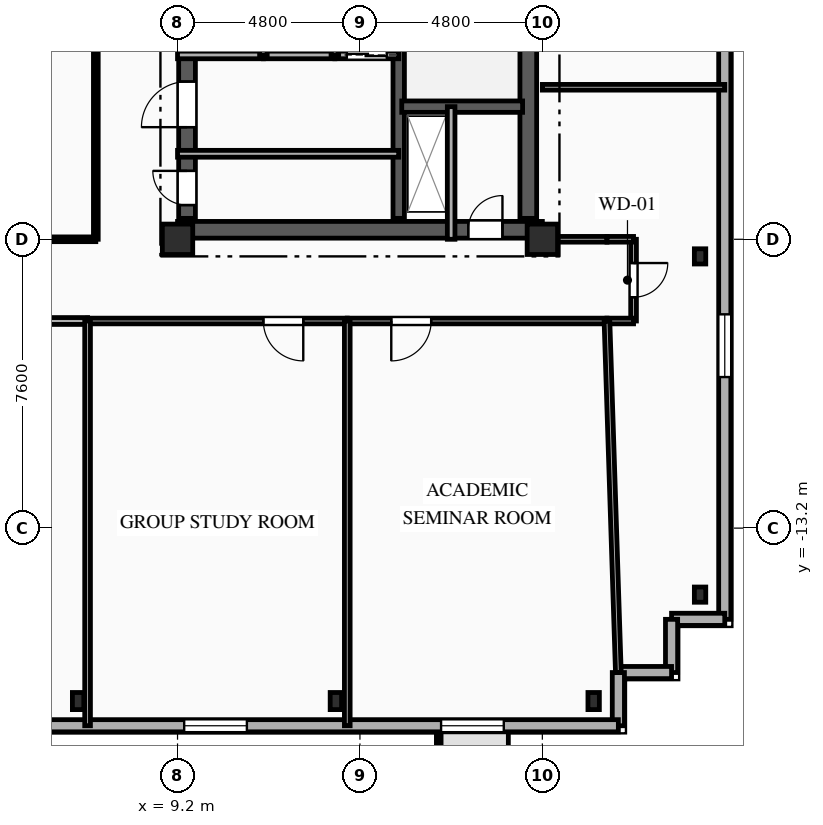
"""IFC4 building model, lengths in metres.
Left out: names, types, materials, properties, quantities, classifications, styles, units other than length and angle.
Written with IfcOpenShell. Run it as: python <this file> out.ifc"""

import sys

from ifc_helpers import new_model, si_unit, direction, frame, frame_2d, origin, origin_2d, place, context, subcontext, project, spatial, rectangle, i_section, extrude, element, fill, save


model = new_model("IFC4")
c1 = context("Model", 3, precision=1e-05, world=origin(), true_north=direction((0.0, 1.0)))
c2 = subcontext(c1, "Body", "Model", "MODEL_VIEW")
j1 = project(units=[si_unit("LENGTHUNIT", "METRE"), si_unit("PLANEANGLEUNIT", "RADIAN")], contexts=[c1])
p1 = place(None, origin())
s1 = spatial("IfcSite", under=j1, at=p1, CompositionType="ELEMENT")
p2 = place(p1, origin())
s2 = spatial("IfcBuilding", under=s1, at=p2, CompositionType="ELEMENT")
p3 = place(p2, frame((0.0, 0.0, 231.65)))
s3 = spatial("IfcBuildingStorey", under=s2, at=p3, CompositionType="ELEMENT", Elevation=231.65)
for number, where, z_axis, x_axis in (
    (1, (9.2, -5.6, 0.0), (0.0, 0.0, 1.0), (1.0, 0.0, 0.0)),
    (2, (18.8, -5.6, 0.0), (0.0, 0.0, 1.0), (1.0, 0.0, 0.0)),
):
    element("IfcColumn", number, at=place(p3, frame(where, z_axis=z_axis, x_axis=x_axis)), inside=s3, PredefinedType="COLUMN", context=c2, shape_type="SweptSolid", body=[
        extrude(rectangle(XDim=0.8, YDim=0.8, at=origin_2d()), origin(), (0.0, 0.0, 1.0), 3.35),
    ])
for number, where, z_axis, x_axis in (
    (3, (6.583, -17.75, 0.0), (0.0, 0.0, 1.0), (1.0, 0.0, 0.0)),
    (4, (13.367, -17.75, 0.0), (0.0, 0.0, 1.0), (1.0, 0.0, 0.0)),
    (5, (20.15, -17.75, 0.0), (0.0, 0.0, 1.0), (1.0, 0.0, 0.0)),
):
    element("IfcColumn", number, at=place(p3, frame(where, z_axis=z_axis, x_axis=x_axis)), inside=s3, PredefinedType="COLUMN", context=c2, shape_type="SweptSolid", body=[
        extrude(i_section(OverallWidth=0.3, OverallDepth=0.45, WebThickness=0.014, FlangeThickness=0.026, FilletRadius=0.027, at=origin_2d()), origin(), (0.0, 0.0, 1.0), 3.35),
    ])
for number, where, z_axis, x_axis in (
    (6, (22.95, -14.95, 0.0), (0.0, 0.0, 1.0), (1.0, 0.0, 0.0)),
    (7, (22.95, -6.05, 0.0), (0.0, 0.0, 1.0), (1.0, 0.0, 0.0)),
):
    element("IfcColumn", number, at=place(p3, frame(where, z_axis=z_axis, x_axis=x_axis)), inside=s3, PredefinedType="COLUMN", context=c2, shape_type="SweptSolid", body=[
        extrude(i_section(OverallWidth=0.3, OverallDepth=0.4, WebThickness=0.013, FlangeThickness=0.024, FilletRadius=0.027, at=origin_2d()), origin(), (0.0, 0.0, 1.0), 3.35),
    ])
p4 = place(p3, frame((23.6, 12.4, 0.0), z_axis=(0.0, 0.0, 1.0), x_axis=(0.0, -1.0, 0.0)))
e8 = element("IfcWall", 8, at=p4, inside=s3, PredefinedType="SOLIDWALL", context=c2, shape_type="SweptSolid", body=[
    extrude(rectangle(XDim=28.0, YDim=0.32, at=frame_2d((14.0, 0.0))), origin(), (0.0, 0.0, 1.0), 3.04),
])
p5 = place(p4, frame((6.415, 0.0, 0.85)))
e9 = element("IfcOpeningElement", 9, at=p5, cuts=e8, PredefinedType="OPENING", context=c2, shape_type="SweptSolid", body=[
    extrude(rectangle(XDim=1.65, YDim=1.85, at=frame_2d((0.825, 0.925))), frame((0.0, 0.17, 0.0), z_axis=(0.0, -1.0, 0.0), x_axis=(1.0, 0.0, 0.0)), (0.0, 0.0, 1.0), 0.34),
])
p6 = place(p4, frame((19.975, 0.0, 0.85)))
e10 = element("IfcOpeningElement", 10, at=p6, cuts=e8, PredefinedType="OPENING", context=c2, shape_type="SweptSolid", body=[
    extrude(rectangle(XDim=1.65, YDim=1.85, at=frame_2d((0.825, 0.925))), frame((0.0, 0.17, 0.0), z_axis=(0.0, -1.0, 0.0), x_axis=(1.0, 0.0, 0.0)), (0.0, 0.0, 1.0), 0.34),
])
p7 = place(p3, frame((23.6, -15.6, 0.0), z_axis=(0.0, 0.0, 1.0), x_axis=(-1.0, 0.0, 0.0)))
e11 = element("IfcWall", 11, at=p7, inside=s3, PredefinedType="SOLIDWALL", context=c2, shape_type="SweptSolid", body=[
    extrude(rectangle(XDim=1.4, YDim=0.32, at=frame_2d((0.7, 0.0))), origin(), (0.0, 0.0, 1.0), 3.04),
])
for number, where, z_axis, x_axis in (
    (12, (22.2, -15.6, 0.0), (0.0, 0.0, 1.0), (0.0, -1.0, 0.0)),
    (13, (22.2, -17.0, 0.0), (0.0, 0.0, 1.0), (-1.0, 0.0, 0.0)),
    (14, (20.8, -17.0, 0.0), (0.0, 0.0, 1.0), (0.0, -1.0, 0.0)),
):
    element("IfcWall", number, at=place(p3, frame(where, z_axis=z_axis, x_axis=x_axis)), inside=s3, PredefinedType="SOLIDWALL", context=c2, shape_type="SweptSolid", body=[
        extrude(rectangle(XDim=1.4, YDim=0.32, at=frame_2d((0.7, 0.0))), origin(), (0.0, 0.0, 1.0), 3.04),
    ])
p8 = place(p3, frame((20.8, -18.4, 0.0), z_axis=(0.0, 0.0, 1.0), x_axis=(-1.0, 0.0, 0.0)))
e15 = element("IfcWall", 15, at=p8, inside=s3, PredefinedType="SOLIDWALL", context=c2, shape_type="SweptSolid", body=[
    extrude(rectangle(XDim=42.0, YDim=0.32, at=frame_2d((21.0, 0.0))), origin(), (0.0, 0.0, 1.0), 3.04),
])
p9 = place(p8, frame((3.015, 0.0, 0.85)))
e16 = element("IfcOpeningElement", 16, at=p9, cuts=e15, PredefinedType="OPENING", context=c2, shape_type="SweptSolid", body=[
    extrude(rectangle(XDim=1.65, YDim=1.85, at=frame_2d((0.825, 0.925))), frame((0.0, 0.17, 0.0), z_axis=(0.0, -1.0, 0.0), x_axis=(1.0, 0.0, 0.0)), (0.0, 0.0, 1.0), 0.34),
])
p10 = place(p8, frame((9.775, 0.0, 0.85)))
e17 = element("IfcOpeningElement", 17, at=p10, cuts=e15, PredefinedType="OPENING", context=c2, shape_type="SweptSolid", body=[
    extrude(rectangle(XDim=1.65, YDim=1.85, at=frame_2d((0.825, 0.925))), frame((0.0, 0.17, 0.0), z_axis=(0.0, -1.0, 0.0), x_axis=(1.0, 0.0, 0.0)), (0.0, 0.0, 1.0), 0.34),
])
p11 = place(p8, frame((19.74, 0.0, 0.85)))
e18 = element("IfcOpeningElement", 18, at=p11, cuts=e15, PredefinedType="OPENING", context=c2, shape_type="SweptSolid", body=[
    extrude(rectangle(XDim=2.2, YDim=1.85, at=frame_2d((1.1, 0.925))), frame((0.0, 0.17, 0.0), z_axis=(0.0, -1.0, 0.0), x_axis=(1.0, 0.0, 0.0)), (0.0, 0.0, 1.0), 0.34),
])
p12 = place(p8, frame((30.255, 0.0, 0.85)))
e19 = element("IfcOpeningElement", 19, at=p12, cuts=e15, PredefinedType="OPENING", context=c2, shape_type="SweptSolid", body=[
    extrude(rectangle(XDim=1.65, YDim=1.85, at=frame_2d((0.825, 0.925))), frame((0.0, 0.17, 0.0), z_axis=(0.0, -1.0, 0.0), x_axis=(1.0, 0.0, 0.0)), (0.0, 0.0, 1.0), 0.34),
])
p13 = place(p8, frame((37.095, 0.0, 0.85)))
e20 = element("IfcOpeningElement", 20, at=p13, cuts=e15, PredefinedType="OPENING", context=c2, shape_type="SweptSolid", body=[
    extrude(rectangle(XDim=1.65, YDim=1.85, at=frame_2d((0.825, 0.925))), frame((0.0, 0.17, 0.0), z_axis=(0.0, -1.0, 0.0), x_axis=(1.0, 0.0, 0.0)), (0.0, 0.0, 1.0), 0.34),
])
p14 = place(p3, frame((9.2, -5.35, 0.0), z_axis=(0.0, 0.0, 1.0), x_axis=(1.0, 0.0, 0.0)))
e21 = element("IfcWall", 21, at=p14, inside=s3, PredefinedType="SHEAR", context=c2, shape_type="SweptSolid", body=[
    extrude(rectangle(XDim=9.6, YDim=0.44, at=frame_2d((4.8, 0.0))), origin(), (0.0, 0.0, 1.0), 3.04),
])
p15 = place(p14, frame((7.65, 0.0, 0.0)))
e22 = element("IfcOpeningElement", 22, at=p15, cuts=e21, PredefinedType="OPENING", context=c2, shape_type="SweptSolid", body=[
    extrude(rectangle(XDim=0.9, YDim=2.1, at=frame_2d((0.45, 1.05))), frame((0.0, 0.23, 0.0), z_axis=(0.0, -1.0, 0.0), x_axis=(1.0, 0.0, 0.0)), (0.0, 0.0, 1.0), 0.46),
])
p16 = place(p3, frame((9.45, -5.05, 0.0), z_axis=(0.0, 0.0, 1.0), x_axis=(0.0, 1.0, 0.0)))
e23 = element("IfcWall", 23, at=p16, inside=s3, PredefinedType="SHEAR", context=c2, shape_type="SweptSolid", body=[
    extrude(rectangle(XDim=10.1, YDim=0.44, at=frame_2d((5.05, 0.0))), origin(), (0.0, 0.0, 1.0), 3.04),
])
p17 = place(p16, frame((7.15, 0.0, 0.0)))
e24 = element("IfcOpeningElement", 24, at=p17, cuts=e23, PredefinedType="OPENING", context=c2, shape_type="SweptSolid", body=[
    extrude(rectangle(XDim=0.9, YDim=2.1, at=frame_2d((0.45, 1.05))), frame((0.0, 0.23, 0.0), z_axis=(0.0, -1.0, 0.0), x_axis=(1.0, 0.0, 0.0)), (0.0, 0.0, 1.0), 0.46),
])
p18 = place(p16, frame((2.4, 0.0, 0.0)))
e25 = element("IfcOpeningElement", 25, at=p18, cuts=e23, PredefinedType="OPENING", context=c2, shape_type="SweptSolid", body=[
    extrude(rectangle(XDim=1.2, YDim=2.15, at=frame_2d((0.6, 1.075))), frame((0.0, 0.23, 0.0), z_axis=(0.0, -1.0, 0.0), x_axis=(1.0, 0.0, 0.0)), (0.0, 0.0, 1.0), 0.46),
])
p19 = place(p16, frame((0.35, 0.0, 0.0)))
e26 = element("IfcOpeningElement", 26, at=p19, cuts=e23, PredefinedType="OPENING", context=c2, shape_type="SweptSolid", body=[
    extrude(rectangle(XDim=0.9, YDim=2.1, at=frame_2d((0.45, 1.05))), frame((0.0, 0.23, 0.0), z_axis=(0.0, -1.0, 0.0), x_axis=(1.0, 0.0, 0.0)), (0.0, 0.0, 1.0), 0.46),
])
p20 = place(p3, frame((18.43, -5.05, 0.0), z_axis=(0.0, 0.0, 1.0), x_axis=(0.0, 1.0, 0.0)))
e27 = element("IfcWall", 27, at=p20, inside=s3, PredefinedType="SHEAR", context=c2, shape_type="SweptSolid", body=[
    extrude(rectangle(XDim=10.1, YDim=0.44, at=frame_2d((5.05, 0.0))), origin(), (0.0, 0.0, 1.0), 3.04),
])
p21 = place(p3, frame((15.02, -5.05, 0.0), z_axis=(0.0, 0.0, 1.0), x_axis=(0.0, 1.0, 0.0)))
e28 = element("IfcWall", 28, at=p21, inside=s3, PredefinedType="SHEAR", context=c2, shape_type="SweptSolid", body=[
    extrude(rectangle(XDim=10.1, YDim=0.3, at=frame_2d((5.05, 0.0))), origin(), (0.0, 0.0, 1.0), 3.04),
])
p22 = place(p3, frame((15.1, -2.11, 0.0), z_axis=(0.0, 0.0, 1.0), x_axis=(1.0, 0.0, 0.0)))
e29 = element("IfcWall", 29, at=p22, inside=s3, PredefinedType="SHEAR", context=c2, shape_type="SweptSolid", body=[
    extrude(rectangle(XDim=3.18, YDim=0.3, at=frame_2d((1.59, 0.0))), origin(), (0.0, 0.0, 1.0), 3.04),
])
p23 = place(p3, frame((16.4, -2.11, 0.0), z_axis=(0.0, 0.0, 1.0), x_axis=(0.0, -1.0, 0.0)))
e30 = element("IfcWall", 30, at=p23, inside=s3, PredefinedType="PARTITIONING", context=c2, shape_type="SweptSolid", body=[
    extrude(rectangle(XDim=3.49, YDim=0.2, at=frame_2d((1.745, 0.0))), origin(), (0.0, 0.0, 1.0), 3.04),
])
p24 = place(p3, frame((9.2, -3.35, 0.0), z_axis=(0.0, 0.0, 1.0), x_axis=(1.0, 0.0, 0.0)))
e31 = element("IfcWall", 31, at=p24, inside=s3, PredefinedType="PARTITIONING", context=c2, shape_type="SweptSolid", body=[
    extrude(rectangle(XDim=5.82, YDim=0.18, at=frame_2d((2.91, 0.0))), origin(), (0.0, 0.0, 1.0), 2.755),
])
p25 = place(p3, frame((11.46, -0.75, 0.0), z_axis=(0.0, 0.0, 1.0), x_axis=(-1.0, 0.0, 0.0)))
e32 = element("IfcWall", 32, at=p25, inside=s3, PredefinedType="PARTITIONING", context=c2, shape_type="SweptSolid", body=[
    extrude(rectangle(XDim=2.26, YDim=0.2, at=frame_2d((1.13, 0.0))), origin(), (0.0, 0.0, 1.0), 3.04),
])
p26 = place(p3, frame((13.34, -0.75, 0.0), z_axis=(0.0, 0.0, 1.0), x_axis=(-1.0, 0.0, 0.0)))
e33 = element("IfcWall", 33, at=p26, inside=s3, PredefinedType="PARTITIONING", context=c2, shape_type="SweptSolid", body=[
    extrude(rectangle(XDim=1.88, YDim=0.2, at=frame_2d((0.94, 0.0))), origin(), (0.0, 0.0, 1.0), 3.04),
])
p27 = place(p3, frame((15.02, -0.75, 0.0), z_axis=(0.0, 0.0, 1.0), x_axis=(-1.0, 0.0, 0.0)))
e34 = element("IfcWall", 34, at=p27, inside=s3, PredefinedType="PARTITIONING", context=c2, shape_type="SweptSolid", body=[
    extrude(rectangle(XDim=1.68, YDim=0.2, at=frame_2d((0.84, 0.0))), origin(), (0.0, 0.0, 1.0), 3.04),
])
p28 = place(p27, frame((0.315, 0.0, 0.0)))
e35 = element("IfcOpeningElement", 35, at=p28, cuts=e34, PredefinedType="OPENING", context=c2, shape_type="SweptSolid", body=[
    extrude(rectangle(XDim=1.05, YDim=2.1, at=frame_2d((0.525, 1.05))), frame((0.0, 0.11, 0.0), z_axis=(0.0, -1.0, 0.0), x_axis=(1.0, 0.0, 0.0)), (0.0, 0.0, 1.0), 0.22),
])
for number, where, z_axis, x_axis in (
    (36, (11.46, -0.75, 0.0), (0.0, 0.0, 1.0), (0.0, 1.0, 0.0)),
    (37, (13.34, -0.75, 0.0), (0.0, 0.0, 1.0), (0.0, 1.0, 0.0)),
):
    element("IfcWall", number, at=place(p3, frame(where, z_axis=z_axis, x_axis=x_axis)), inside=s3, PredefinedType="PARTITIONING", context=c2, shape_type="SweptSolid", body=[
        extrude(rectangle(XDim=2.3, YDim=0.2, at=frame_2d((1.15, 0.0))), origin(), (0.0, 0.0, 1.0), 3.04),
    ])
p29 = place(p3, frame((21.2, -5.6, 0.0), z_axis=(0.0, 0.0, 1.0), x_axis=(0.0, -1.0, 0.0)))
e38 = element("IfcWall", 38, at=p29, inside=s3, PredefinedType="PARTITIONING", context=c2, shape_type="SweptSolid", body=[
    extrude(rectangle(XDim=2.15, YDim=0.15, at=frame_2d((1.075, 0.0))), origin(), (0.0, 0.0, 1.0), 3.04),
])
p30 = place(p29, frame((0.625, 0.0, 0.0)))
e39 = element("IfcOpeningElement", 39, at=p30, cuts=e38, PredefinedType="OPENING", context=c2, shape_type="SweptSolid", body=[
    extrude(rectangle(XDim=0.9, YDim=2.1, at=frame_2d((0.45, 1.05))), frame((0.0, 0.085, 0.0), z_axis=(0.0, -1.0, 0.0), x_axis=(1.0, 0.0, 0.0)), (0.0, 0.0, 1.0), 0.17),
])
p31 = place(p3, frame((18.8, -5.6, 0.0), z_axis=(0.0, 0.0, 1.0), x_axis=(1.0, 0.0, 0.0)))
e40 = element("IfcWall", 40, at=p31, inside=s3, PredefinedType="PARTITIONING", context=c2, shape_type="SweptSolid", body=[
    extrude(rectangle(XDim=1.7, YDim=0.15, at=frame_2d((0.85, 0.0))), origin(), (0.0, 0.0, 1.0), 3.04),
])
for number, where, z_axis, x_axis in (
    (41, (20.5, -5.6, 0.0), (0.0, 0.0, 1.0), (1.0, 0.0, 0.0)),
    (42, (21.2, -7.75, 0.0), (0.0, 0.0, 1.0), (-1.0, 0.0, 0.0)),
):
    element("IfcWall", number, at=place(p3, frame(where, z_axis=z_axis, x_axis=x_axis)), inside=s3, PredefinedType="PARTITIONING", context=c2, shape_type="SweptSolid", body=[
        extrude(rectangle(XDim=0.7, YDim=0.15, at=frame_2d((0.35, 0.0))), origin(), (0.0, 0.0, 1.0), 3.04),
    ])
p32 = place(p3, frame((6.833, -7.75, 0.0), z_axis=(0.0, 0.0, 1.0), x_axis=(-1.0, 0.0, 0.0)))
e43 = element("IfcWall", 43, at=p32, inside=s3, PredefinedType="PARTITIONING", context=c2, shape_type="SweptSolid", body=[
    extrude(rectangle(XDim=6.833, YDim=0.18, at=frame_2d((3.417, 0.0))), origin(), (0.0, 0.0, 1.0), 3.04),
])
p33 = place(p32, frame((4.669, 0.0, 0.0)))
e44 = element("IfcOpeningElement", 44, at=p33, cuts=e43, PredefinedType="OPENING", context=c2, shape_type="SweptSolid", body=[
    extrude(rectangle(XDim=1.0, YDim=2.15, at=frame_2d((0.5, 1.075))), frame((0.0, 0.1, 0.0), z_axis=(0.0, -1.0, 0.0), x_axis=(1.0, 0.0, 0.0)), (0.0, 0.0, 1.0), 0.2),
])
p34 = place(p3, frame((13.667, -7.75, 0.0), z_axis=(0.0, 0.0, 1.0), x_axis=(-1.0, 0.0, 0.0)))
e45 = element("IfcWall", 45, at=p34, inside=s3, PredefinedType="PARTITIONING", context=c2, shape_type="SweptSolid", body=[
    extrude(rectangle(XDim=6.833, YDim=0.15, at=frame_2d((3.417, 0.0))), origin(), (0.0, 0.0, 1.0), 3.04),
])
p35 = place(p34, frame((1.158, 0.0, 0.0)))
e46 = element("IfcOpeningElement", 46, at=p35, cuts=e45, PredefinedType="OPENING", context=c2, shape_type="SweptSolid", body=[
    extrude(rectangle(XDim=1.05, YDim=2.15, at=frame_2d((0.525, 1.075))), frame((0.0, 0.085, 0.0), z_axis=(0.0, -1.0, 0.0), x_axis=(1.0, 0.0, 0.0)), (0.0, 0.0, 1.0), 0.17),
])
p36 = place(p3, frame((20.5, -7.75, 0.0), z_axis=(0.0, 0.0, 1.0), x_axis=(-1.0, 0.0, 0.0)))
e47 = element("IfcWall", 47, at=p36, inside=s3, PredefinedType="PARTITIONING", context=c2, shape_type="SweptSolid", body=[
    extrude(rectangle(XDim=6.833, YDim=0.15, at=frame_2d((3.417, 0.0))), origin(), (0.0, 0.0, 1.0), 3.04),
])
p37 = place(p36, frame((4.625, 0.0, 0.0)))
e48 = element("IfcOpeningElement", 48, at=p37, cuts=e47, PredefinedType="OPENING", context=c2, shape_type="SweptSolid", body=[
    extrude(rectangle(XDim=1.05, YDim=2.15, at=frame_2d((0.525, 1.075))), frame((0.0, 0.085, 0.0), z_axis=(0.0, -1.0, 0.0), x_axis=(1.0, 0.0, 0.0)), (0.0, 0.0, 1.0), 0.17),
])
p38 = place(p3, frame((0.0, -5.6, 0.0), z_axis=(0.0, 0.0, 1.0), x_axis=(1.0, 0.0, 0.0)))
e49 = element("IfcWall", 49, at=p38, inside=s3, PredefinedType="PARTITIONING", context=c2, shape_type="SweptSolid", body=[
    extrude(rectangle(XDim=7.05, YDim=0.125, at=frame_2d((3.525, 0.0))), origin(), (0.0, 0.0, 1.0), 2.525),
])
p39 = place(p3, frame((7.05, -5.6, 0.0), z_axis=(0.0, 0.0, 1.0), x_axis=(0.0, 1.0, 0.0)))
e50 = element("IfcWall", 50, at=p39, inside=s3, PredefinedType="PARTITIONING", context=c2, shape_type="SweptSolid", body=[
    extrude(rectangle(XDim=14.1, YDim=0.125, at=frame_2d((7.05, 0.0))), origin(), (0.0, 0.0, 1.0), 3.04),
])
p40 = place(p39, frame((5.076, 0.0, 0.0)))
e51 = element("IfcOpeningElement", 51, at=p40, cuts=e50, PredefinedType="OPENING", context=c2, shape_type="SweptSolid", body=[
    extrude(rectangle(XDim=0.95, YDim=2.1, at=frame_2d((0.475, 1.05))), frame((0.0, 0.073, 0.0), z_axis=(0.0, -1.0, 0.0), x_axis=(1.0, 0.0, 0.0)), (0.0, 0.0, 1.0), 0.145),
])
p41 = place(p3, frame((18.8, -1.6, 0.0), z_axis=(0.0, 0.0, 1.0), x_axis=(1.0, 0.0, 0.0)))
e52 = element("IfcWall", 52, at=p41, inside=s3, PredefinedType="PARTITIONING", context=c2, shape_type="SweptSolid", body=[
    extrude(rectangle(XDim=4.8, YDim=0.15, at=frame_2d((2.4, 0.0))), origin(), (0.0, 0.0, 1.0), 3.04),
])
p42 = place(p3, frame((20.8, -17.0, 0.0), z_axis=(0.0, 0.0, 1.0), x_axis=(-0.032420659042, 0.99947431226, 0.0)))
e53 = element("IfcWall", 53, at=p42, inside=s3, PredefinedType="PARTITIONING", context=c2, shape_type="SweptSolid", body=[
    extrude(rectangle(XDim=9.255, YDim=0.15, at=frame_2d((4.627, 0.0))), origin(), (0.0, 0.0, 1.0), 3.04),
])
p43 = place(p3, frame((6.833, -7.75, 0.0), z_axis=(0.0, 0.0, 1.0), x_axis=(0.0, -1.0, 0.0)))
e54 = element("IfcWall", 54, at=p43, inside=s3, PredefinedType="PARTITIONING", context=c2, shape_type="SweptSolid", body=[
    extrude(rectangle(XDim=10.65, YDim=0.15, at=frame_2d((5.325, 0.0))), origin(), (0.0, 0.0, 1.0), 2.665),
])
p44 = place(p3, frame((13.667, -7.75, 0.0), z_axis=(0.0, 0.0, 1.0), x_axis=(0.0, -1.0, 0.0)))
e55 = element("IfcWall", 55, at=p44, inside=s3, PredefinedType="PARTITIONING", context=c2, shape_type="SweptSolid", body=[
    extrude(rectangle(XDim=10.65, YDim=0.15, at=frame_2d((5.325, 0.0))), origin(), (0.0, 0.0, 1.0), 3.04),
])
p45 = place(p6, origin())
e56 = element("IfcWindow", 56, at=p45, inside=s3, PartitioningType="SINGLE_PANEL", PredefinedType="WINDOW", context=c2, shape_type="SweptSolid", body=[
    extrude(rectangle(XDim=1.65, YDim=1.85, at=frame_2d((0.825, 0.925))), frame((0.0, 0.03, 0.0), z_axis=(0.0, -1.0, 0.0), x_axis=(1.0, 0.0, 0.0)), (0.0, 0.0, 1.0), 0.06),
])
fill(e10, e56)
p46 = place(p9, origin())
e57 = element("IfcWindow", 57, at=p46, inside=s3, PartitioningType="SINGLE_PANEL", PredefinedType="WINDOW", context=c2, shape_type="SweptSolid", body=[
    extrude(rectangle(XDim=1.65, YDim=1.85, at=frame_2d((0.825, 0.925))), frame((0.0, 0.03, 0.0), z_axis=(0.0, -1.0, 0.0), x_axis=(1.0, 0.0, 0.0)), (0.0, 0.0, 1.0), 0.06),
])
fill(e16, e57)
p47 = place(p10, origin())
e58 = element("IfcWindow", 58, at=p47, inside=s3, PartitioningType="SINGLE_PANEL", PredefinedType="WINDOW", context=c2, shape_type="SweptSolid", body=[
    extrude(rectangle(XDim=1.65, YDim=1.85, at=frame_2d((0.825, 0.925))), frame((0.0, 0.03, 0.0), z_axis=(0.0, -1.0, 0.0), x_axis=(1.0, 0.0, 0.0)), (0.0, 0.0, 1.0), 0.06),
])
fill(e17, e58)
p48 = place(p15, origin())
e59 = element("IfcDoor", 59, at=p48, inside=s3, OperationType="SINGLE_SWING_RIGHT", PredefinedType="DOOR", context=c2, shape_type="SweptSolid", body=[
    extrude(rectangle(XDim=0.9, YDim=2.1, at=frame_2d((0.45, 1.05))), frame((0.0, 0.025, 0.0), z_axis=(0.0, -1.0, 0.0), x_axis=(1.0, 0.0, 0.0)), (0.0, 0.0, 1.0), 0.05),
])
fill(e22, e59)
p49 = place(p28, origin())
e60 = element("IfcDoor", 60, at=p49, inside=s3, OperationType="DOUBLE_DOOR_SLIDING", PredefinedType="DOOR", context=c2, shape_type="SweptSolid", body=[
    extrude(rectangle(XDim=1.05, YDim=2.1, at=frame_2d((0.525, 1.05))), frame((0.0, 0.025, 0.0), z_axis=(0.0, -1.0, 0.0), x_axis=(1.0, 0.0, 0.0)), (0.0, 0.0, 1.0), 0.05),
])
fill(e35, e60)
p50 = place(p18, origin())
e61 = element("IfcDoor", 61, at=p50, inside=s3, OperationType="SINGLE_SWING_LEFT", PredefinedType="DOOR", context=c2, shape_type="SweptSolid", body=[
    extrude(rectangle(XDim=1.2, YDim=2.15, at=frame_2d((0.6, 1.075))), frame((0.0, 0.025, 0.0), z_axis=(0.0, -1.0, 0.0), x_axis=(1.0, 0.0, 0.0)), (0.0, 0.0, 1.0), 0.05),
])
fill(e25, e61)
p51 = place(p19, origin())
e62 = element("IfcDoor", 62, at=p51, inside=s3, OperationType="SINGLE_SWING_RIGHT", PredefinedType="DOOR", context=c2, shape_type="SweptSolid", body=[
    extrude(rectangle(XDim=0.9, YDim=2.1, at=frame_2d((0.45, 1.05))), frame((0.0, 0.025, 0.0), z_axis=(0.0, -1.0, 0.0), x_axis=(1.0, 0.0, 0.0)), (0.0, 0.0, 1.0), 0.05),
])
fill(e26, e62)
p52 = place(p30, origin())
e63 = element("IfcDoor", 63, at=p52, inside=s3, OperationType="SINGLE_SWING_LEFT", PredefinedType="DOOR", context=c2, shape_type="SweptSolid", body=[
    extrude(rectangle(XDim=0.9, YDim=2.1, at=frame_2d((0.45, 1.05))), frame((0.0, 0.025, 0.0), z_axis=(0.0, -1.0, 0.0), x_axis=(1.0, 0.0, 0.0)), (0.0, 0.0, 1.0), 0.05),
])
fill(e39, e63)
p53 = place(p35, origin())
e64 = element("IfcDoor", 64, at=p53, inside=s3, OperationType="SINGLE_SWING_LEFT", PredefinedType="DOOR", context=c2, shape_type="SweptSolid", body=[
    extrude(rectangle(XDim=1.05, YDim=2.15, at=frame_2d((0.525, 1.075))), frame((0.0, 0.025, 0.0), z_axis=(0.0, -1.0, 0.0), x_axis=(1.0, 0.0, 0.0)), (0.0, 0.0, 1.0), 0.05),
])
fill(e46, e64)
p54 = place(p37, origin())
e65 = element("IfcDoor", 65, at=p54, inside=s3, OperationType="SINGLE_SWING_RIGHT", PredefinedType="DOOR", context=c2, shape_type="SweptSolid", body=[
    extrude(rectangle(XDim=1.05, YDim=2.15, at=frame_2d((0.525, 1.075))), frame((0.0, 0.025, 0.0), z_axis=(0.0, -1.0, 0.0), x_axis=(1.0, 0.0, 0.0)), (0.0, 0.0, 1.0), 0.05),
])
fill(e48, e65)
save(model, sys.argv[1])
